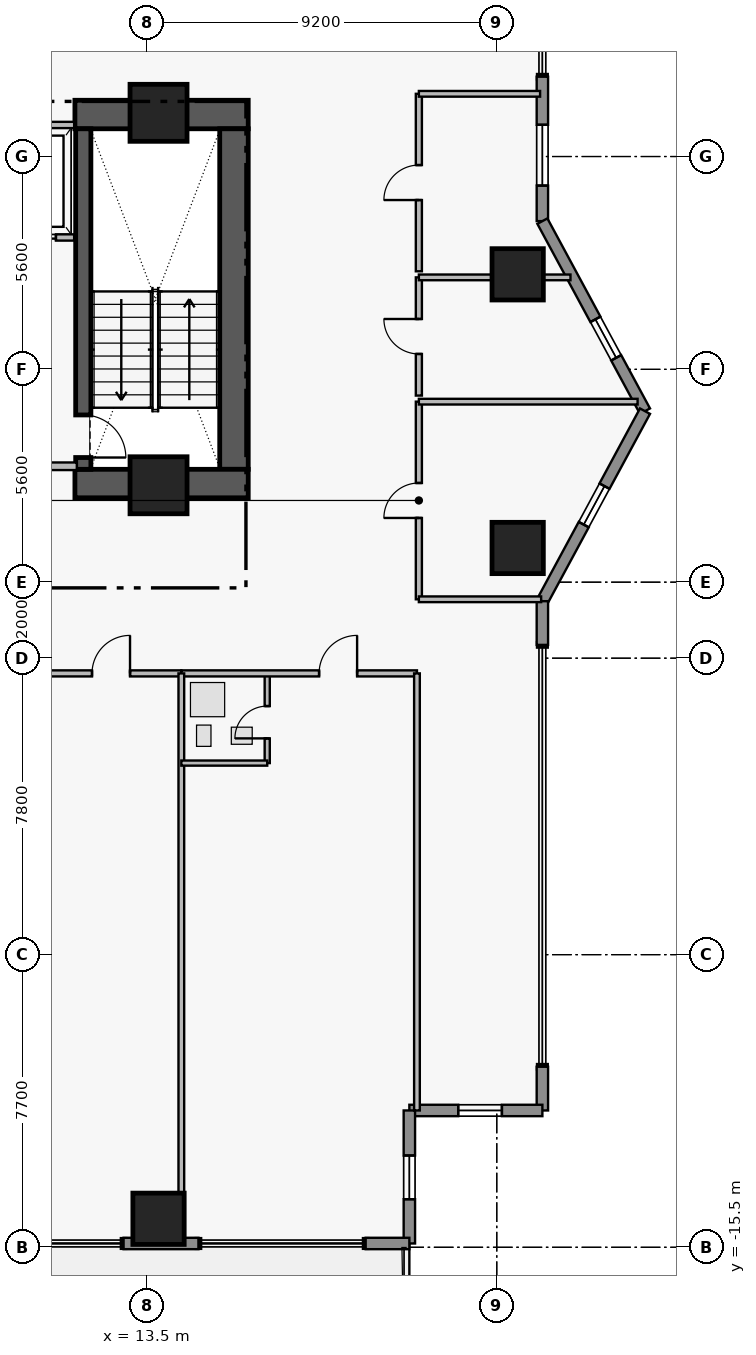
"""IFC4 building model, lengths in metres.
Left out: names, types, materials, properties, quantities, classifications, styles, units other than length and angle.
Written with IfcOpenShell. Run it as: python <this file> out.ifc"""

import sys

from ifc_helpers import new_model, si_unit, direction, frame, frame_2d, origin, origin_2d, place, context, subcontext, project, spatial, rectangle, extrude, element, fill, save


model = new_model("IFC4")
c1 = context("Model", 3, precision=1e-05, world=origin(), true_north=direction((0.0, 1.0)))
c2 = subcontext(c1, "Body", "Model", "MODEL_VIEW")
j1 = project(units=[si_unit("LENGTHUNIT", "METRE"), si_unit("PLANEANGLEUNIT", "RADIAN")], contexts=[c1])
p1 = place(None, origin())
s1 = spatial("IfcSite", under=j1, at=p1, CompositionType="ELEMENT")
p2 = place(p1, origin())
s2 = spatial("IfcBuilding", under=s1, at=p2, CompositionType="ELEMENT")
p3 = place(p2, frame((0.0, 0.0, 150.4)))
s3 = spatial("IfcBuildingStorey", under=s2, at=p3, CompositionType="ELEMENT", Elevation=150.4)
p4 = place(p3, frame((11.6, 14.305, 0.0), z_axis=(0.0, 0.0, 1.0), x_axis=(1.0, 0.0, 0.0)))
e1 = element("IfcWall", 1, at=p4, inside=s3, PredefinedType="SHEAR", context=c2, shape_type="SweptSolid", body=[
    extrude(rectangle(XDim=4.56, YDim=0.75, at=frame_2d((2.28, 0.0))), origin(), (0.0, 0.0, 1.0), 3.46),
])
p5 = place(p3, frame((15.785, 4.97, 0.0), z_axis=(0.0, 0.0, 1.0), x_axis=(0.0, 1.0, 0.0)))
e2 = element("IfcWall", 2, at=p5, inside=s3, PredefinedType="SHEAR", context=c2, shape_type="SweptSolid", body=[
    extrude(rectangle(XDim=8.96, YDim=0.75, at=frame_2d((4.48, 0.0))), origin(), (0.0, 0.0, 1.0), 3.46),
])
p6 = place(p3, frame((11.6, 4.595, 0.0), z_axis=(0.0, 0.0, 1.0), x_axis=(1.0, 0.0, 0.0)))
e3 = element("IfcWall", 3, at=p6, inside=s3, PredefinedType="SHEAR", context=c2, shape_type="SweptSolid", body=[
    extrude(rectangle(XDim=4.56, YDim=0.75, at=frame_2d((2.28, 0.0))), origin(), (0.0, 0.0, 1.0), 3.46),
])
p7 = place(p3, frame((11.82, 13.93, 0.0), z_axis=(0.0, 0.0, 1.0), x_axis=(0.0, -1.0, 0.0)))
e4 = element("IfcWall", 4, at=p7, inside=s3, PredefinedType="SHEAR", context=c2, shape_type="SweptSolid", body=[
    extrude(rectangle(XDim=8.96, YDim=0.4, at=frame_2d((4.48, 0.0))), origin(), (0.0, 0.0, 1.0), 3.46),
])
p8 = place(p7, frame((7.53, 0.0, 0.0)))
e5 = element("IfcOpeningElement", 5, at=p8, cuts=e4, PredefinedType="OPENING", context=c2, shape_type="SweptSolid", body=[
    extrude(rectangle(XDim=1.12, YDim=2.22, at=frame_2d((0.56, 1.11))), frame((0.0, 0.21, 0.0), z_axis=(0.0, -1.0, 0.0), x_axis=(1.0, 0.0, 0.0)), (0.0, 0.0, 1.0), 0.42),
])
for number, where, z_axis, x_axis in (
    (6, (13.8, 14.35, 0.0), (0.0, 0.0, 1.0), (1.0, 0.0, 0.0)),
    (7, (13.8, 4.55, 0.0), (0.0, 0.0, 1.0), (1.0, 0.0, 0.0)),
):
    element("IfcColumn", number, at=place(p3, frame(where, z_axis=z_axis, x_axis=x_axis)), inside=s3, PredefinedType="COLUMN", context=c2, shape_type="SweptSolid", body=[
        extrude(rectangle(XDim=1.5, YDim=1.5, at=origin_2d()), origin(), (0.0, 0.0, 1.0), 3.65),
    ])
for number, where, z_axis, x_axis in (
    (8, (13.8, -14.75, 0.0), (0.0, 0.0, 1.0), (1.0, 0.0, 0.0)),
    (9, (23.25, 2.9, 0.0), (0.0, 0.0, 1.0), (1.0, 0.0, 0.0)),
    (10, (23.25, 10.1, 0.0), (0.0, 0.0, 1.0), (1.0, 0.0, 0.0)),
):
    element("IfcColumn", number, at=place(p3, frame(where, z_axis=z_axis, x_axis=x_axis)), inside=s3, PredefinedType="COLUMN", context=c2, shape_type="SweptSolid", body=[
        extrude(rectangle(XDim=1.35, YDim=1.35, at=origin_2d()), origin(), (0.0, 0.0, 1.0), 3.65),
    ])
p9 = place(p3, frame((23.9, 15.3, 0.0), z_axis=(0.0, 0.0, 1.0), x_axis=(0.0, -1.0, 0.0)))
e11 = element("IfcWall", 11, at=p9, inside=s3, PredefinedType="STANDARD", context=c2, shape_type="SweptSolid", body=[
    extrude(rectangle(XDim=3.8, YDim=0.3, at=frame_2d((1.9, 0.0))), origin(), (0.0, 0.0, 1.0), 3.43),
])
p10 = place(p9, frame((1.265, 0.0, 0.85)))
e12 = element("IfcOpeningElement", 12, at=p10, cuts=e11, PredefinedType="OPENING", context=c2, shape_type="SweptSolid", body=[
    extrude(rectangle(XDim=1.6, YDim=1.8, at=frame_2d((0.8, 0.9))), frame((0.0, 0.16, 0.0), z_axis=(0.0, -1.0, 0.0), x_axis=(1.0, 0.0, 0.0)), (0.0, 0.0, 1.0), 0.32),
])
p11 = place(p3, frame((23.9, 11.5, 0.0), z_axis=(0.0, 0.0, 1.0), x_axis=(0.475175525499, -0.879891027325, 0.0)))
e13 = element("IfcWall", 13, at=p11, inside=s3, PredefinedType="STANDARD", context=c2, shape_type="SweptSolid", body=[
    extrude(rectangle(XDim=5.683, YDim=0.3, at=frame_2d((2.841, 0.0))), origin(), (0.0, 0.0, 1.0), 3.43),
])
p12 = place(p11, frame((2.937, 0.0, 1.25)))
e14 = element("IfcOpeningElement", 14, at=p12, cuts=e13, PredefinedType="OPENING", context=c2, shape_type="SweptSolid", body=[
    extrude(rectangle(XDim=1.15, YDim=1.55, at=frame_2d((0.575, 0.775))), frame((0.0, 0.16, 0.0), z_axis=(0.0, -1.0, 0.0), x_axis=(1.0, 0.0, 0.0)), (0.0, 0.0, 1.0), 0.32),
])
p13 = place(p3, frame((26.6, 6.5, 0.0), z_axis=(0.0, 0.0, 1.0), x_axis=(-0.475175525499, -0.879891027325, 0.0)))
e15 = element("IfcWall", 15, at=p13, inside=s3, PredefinedType="STANDARD", context=c2, shape_type="SweptSolid", body=[
    extrude(rectangle(XDim=5.683, YDim=0.3, at=frame_2d((2.841, 0.0))), origin(), (0.0, 0.0, 1.0), 3.43),
])
p14 = place(p13, frame((2.242, 0.0, 1.25)))
e16 = element("IfcOpeningElement", 16, at=p14, cuts=e15, PredefinedType="OPENING", context=c2, shape_type="SweptSolid", body=[
    extrude(rectangle(XDim=1.15, YDim=1.55, at=frame_2d((0.575, 0.775))), frame((0.0, 0.16, 0.0), z_axis=(0.0, -1.0, 0.0), x_axis=(1.0, 0.0, 0.0)), (0.0, 0.0, 1.0), 0.32),
])
for number, where, z_axis, x_axis in (
    (17, (23.9, 1.5, 0.0), (0.0, 0.0, 1.0), (0.0, -1.0, 0.0)),
    (18, (23.9, -10.75, 0.0), (0.0, 0.0, 1.0), (0.0, -1.0, 0.0)),
):
    element("IfcWall", number, at=place(p3, frame(where, z_axis=z_axis, x_axis=x_axis)), inside=s3, PredefinedType="STANDARD", context=c2, shape_type="SweptSolid", body=[
        extrude(rectangle(XDim=1.15, YDim=0.3, at=frame_2d((0.575, 0.0))), origin(), (0.0, 0.0, 1.0), 3.43),
    ])
p15 = place(p3, frame((23.9, -11.9, 0.0), z_axis=(0.0, 0.0, 1.0), x_axis=(-1.0, 0.0, 0.0)))
e19 = element("IfcWall", 19, at=p15, inside=s3, PredefinedType="STANDARD", context=c2, shape_type="SweptSolid", body=[
    extrude(rectangle(XDim=3.5, YDim=0.3, at=frame_2d((1.75, 0.0))), origin(), (0.0, 0.0, 1.0), 3.43),
])
p16 = place(p15, frame((1.065, 0.0, 1.25)))
e20 = element("IfcOpeningElement", 20, at=p16, cuts=e19, PredefinedType="OPENING", context=c2, shape_type="SweptSolid", body=[
    extrude(rectangle(XDim=1.15, YDim=1.55, at=frame_2d((0.575, 0.775))), frame((0.0, 0.16, 0.0), z_axis=(0.0, -1.0, 0.0), x_axis=(1.0, 0.0, 0.0)), (0.0, 0.0, 1.0), 0.32),
])
p17 = place(p3, frame((20.4, -11.9, 0.0), z_axis=(0.0, 0.0, 1.0), x_axis=(0.0, -1.0, 0.0)))
e21 = element("IfcWall", 21, at=p17, inside=s3, PredefinedType="STANDARD", context=c2, shape_type="SweptSolid", body=[
    extrude(rectangle(XDim=3.5, YDim=0.3, at=frame_2d((1.75, 0.0))), origin(), (0.0, 0.0, 1.0), 3.43),
])
p18 = place(p17, frame((1.185, 0.0, 1.25)))
e22 = element("IfcOpeningElement", 22, at=p18, cuts=e21, PredefinedType="OPENING", context=c2, shape_type="SweptSolid", body=[
    extrude(rectangle(XDim=1.15, YDim=1.55, at=frame_2d((0.575, 0.775))), frame((0.0, 0.16, 0.0), z_axis=(0.0, -1.0, 0.0), x_axis=(1.0, 0.0, 0.0)), (0.0, 0.0, 1.0), 0.32),
])
p19 = place(p3, frame((20.4, -15.4, 0.0), z_axis=(0.0, 0.0, 1.0), x_axis=(-1.0, 0.0, 0.0)))
e23 = element("IfcWall", 23, at=p19, inside=s3, PredefinedType="STANDARD", context=c2, shape_type="SweptSolid", body=[
    extrude(rectangle(XDim=1.15, YDim=0.3, at=frame_2d((0.575, 0.0))), origin(), (0.0, 0.0, 1.0), 3.43),
])
p20 = place(p3, frame((14.85, -15.4, 0.0), z_axis=(0.0, 0.0, 1.0), x_axis=(-1.0, 0.0, 0.0)))
e24 = element("IfcWall", 24, at=p20, inside=s3, PredefinedType="STANDARD", context=c2, shape_type="SweptSolid", body=[
    extrude(rectangle(XDim=1.97, YDim=0.3, at=frame_2d((0.985, 0.0))), origin(), (0.0, 0.0, 1.0), 3.43),
])
p21 = place(p3, frame((9.42, 11.07, 0.0), z_axis=(0.0, 0.0, 1.0), x_axis=(1.0, 0.0, 0.0)))
e25 = element("IfcWall", 25, at=p21, inside=s3, PredefinedType="PARTITIONING", context=c2, shape_type="SweptSolid", body=[
    extrude(rectangle(XDim=2.16, YDim=0.165, at=frame_2d((1.08, 0.0))), origin(), (0.0, 0.0, 1.0), 3.43),
])
p22 = place(p21, frame((0.53, 0.0, 0.0)))
e26 = element("IfcOpeningElement", 26, at=p22, cuts=e25, PredefinedType="OPENING", context=c2, shape_type="SweptSolid", body=[
    extrude(rectangle(XDim=1.15, YDim=2.25, at=frame_2d((0.575, 1.125))), frame((0.0, 0.093, 0.0), z_axis=(0.0, -1.0, 0.0), x_axis=(1.0, 0.0, 0.0)), (0.0, 0.0, 1.0), 0.185),
])
p23 = place(p3, frame((8.4, -0.4, 0.0), z_axis=(0.0, 0.0, 1.0), x_axis=(1.0, 0.0, 0.0)))
e27 = element("IfcWall", 27, at=p23, inside=s3, PredefinedType="PARTITIONING", context=c2, shape_type="SweptSolid", body=[
    extrude(rectangle(XDim=6.0, YDim=0.16, at=frame_2d((3.0, 0.0))), origin(), (0.0, 0.0, 1.0), 3.43),
])
p24 = place(p23, frame((3.65, 0.0, 0.0)))
e28 = element("IfcOpeningElement", 28, at=p24, cuts=e27, PredefinedType="OPENING", context=c2, shape_type="SweptSolid", body=[
    extrude(rectangle(XDim=1.0, YDim=2.15, at=frame_2d((0.5, 1.075))), frame((0.0, 0.09, 0.0), z_axis=(0.0, -1.0, 0.0), x_axis=(1.0, 0.0, 0.0)), (0.0, 0.0, 1.0), 0.18),
])
p25 = place(p3, frame((16.66, -2.76, 0.0), z_axis=(0.0, 0.0, 1.0), x_axis=(0.0, 1.0, 0.0)))
e29 = element("IfcWall", 29, at=p25, inside=s3, PredefinedType="PLUMBINGWALL", context=c2, shape_type="SweptSolid", body=[
    extrude(rectangle(XDim=2.36, YDim=0.135, at=frame_2d((1.18, 0.0))), origin(), (0.0, 0.0, 1.0), 3.43),
])
p26 = place(p25, frame((0.65, 0.0, 0.0)))
e30 = element("IfcOpeningElement", 30, at=p26, cuts=e29, PredefinedType="OPENING", context=c2, shape_type="SweptSolid", body=[
    extrude(rectangle(XDim=0.85, YDim=2.1, at=frame_2d((0.425, 1.05))), frame((0.0, 0.077, 0.0), z_axis=(0.0, -1.0, 0.0), x_axis=(1.0, 0.0, 0.0)), (0.0, 0.0, 1.0), 0.155),
])
p27 = place(p3, frame((14.4, -0.4, 0.0), z_axis=(0.0, 0.0, 1.0), x_axis=(1.0, 0.0, 0.0)))
e31 = element("IfcWall", 31, at=p27, inside=s3, PredefinedType="PARTITIONING", context=c2, shape_type="SweptSolid", body=[
    extrude(rectangle(XDim=6.2, YDim=0.16, at=frame_2d((3.1, 0.0))), origin(), (0.0, 0.0, 1.0), 3.43),
])
p28 = place(p27, frame((3.625, 0.0, 0.0)))
e32 = element("IfcOpeningElement", 32, at=p28, cuts=e31, PredefinedType="OPENING", context=c2, shape_type="SweptSolid", body=[
    extrude(rectangle(XDim=1.0, YDim=2.15, at=frame_2d((0.5, 1.075))), frame((0.0, 0.09, 0.0), z_axis=(0.0, -1.0, 0.0), x_axis=(1.0, 0.0, 0.0)), (0.0, 0.0, 1.0), 0.18),
])
p29 = place(p3, frame((20.65, 1.55, 0.0), z_axis=(0.0, 0.0, 1.0), x_axis=(0.0, 1.0, 0.0)))
e33 = element("IfcWall", 33, at=p29, inside=s3, PredefinedType="PARTITIONING", context=c2, shape_type="SweptSolid", body=[
    extrude(rectangle(XDim=5.2, YDim=0.16, at=frame_2d((2.6, 0.0))), origin(), (0.0, 0.0, 1.0), 3.43),
])
p30 = place(p29, frame((2.14, 0.0, 0.0)))
e34 = element("IfcOpeningElement", 34, at=p30, cuts=e33, PredefinedType="OPENING", context=c2, shape_type="SweptSolid", body=[
    extrude(rectangle(XDim=0.92, YDim=2.12, at=frame_2d((0.46, 1.06))), frame((0.0, 0.09, 0.0), z_axis=(0.0, -1.0, 0.0), x_axis=(1.0, 0.0, 0.0)), (0.0, 0.0, 1.0), 0.18),
])
p31 = place(p3, frame((20.65, 6.91, 0.0), z_axis=(0.0, 0.0, 1.0), x_axis=(0.0, 1.0, 0.0)))
e35 = element("IfcWall", 35, at=p31, inside=s3, PredefinedType="PARTITIONING", context=c2, shape_type="SweptSolid", body=[
    extrude(rectangle(XDim=3.11, YDim=0.16, at=frame_2d((1.555, 0.0))), origin(), (0.0, 0.0, 1.0), 3.43),
])
p32 = place(p31, frame((1.095, 0.0, 0.0)))
e36 = element("IfcOpeningElement", 36, at=p32, cuts=e35, PredefinedType="OPENING", context=c2, shape_type="SweptSolid", body=[
    extrude(rectangle(XDim=0.92, YDim=2.12, at=frame_2d((0.46, 1.06))), frame((0.0, 0.09, 0.0), z_axis=(0.0, -1.0, 0.0), x_axis=(1.0, 0.0, 0.0)), (0.0, 0.0, 1.0), 0.18),
])
p33 = place(p3, frame((20.65, 10.18, 0.0), z_axis=(0.0, 0.0, 1.0), x_axis=(0.0, 1.0, 0.0)))
e37 = element("IfcWall", 37, at=p33, inside=s3, PredefinedType="PARTITIONING", context=c2, shape_type="SweptSolid", body=[
    extrude(rectangle(XDim=4.67, YDim=0.16, at=frame_2d((2.335, 0.0))), origin(), (0.0, 0.0, 1.0), 3.43),
])
p34 = place(p33, frame((1.875, 0.0, 0.0)))
e38 = element("IfcOpeningElement", 38, at=p34, cuts=e37, PredefinedType="OPENING", context=c2, shape_type="SweptSolid", body=[
    extrude(rectangle(XDim=0.92, YDim=2.12, at=frame_2d((0.46, 1.06))), frame((0.0, 0.09, 0.0), z_axis=(0.0, -1.0, 0.0), x_axis=(1.0, 0.0, 0.0)), (0.0, 0.0, 1.0), 0.18),
])
p35 = place(p3, frame((8.8, 5.05, 0.0), z_axis=(0.0, 0.0, 1.0), x_axis=(1.0, 0.0, 0.0)))
e39 = element("IfcWall", 39, at=p35, inside=s3, PredefinedType="PARTITIONING", context=c2, shape_type="SweptSolid", body=[
    extrude(rectangle(XDim=2.85, YDim=0.2, at=frame_2d((1.425, 0.0))), origin(), (0.0, 0.0, 1.0), 3.43),
])
p36 = place(p3, frame((9.42, 14.03, 0.0), z_axis=(0.0, 0.0, 1.0), x_axis=(1.0, 0.0, 0.0)))
e40 = element("IfcWall", 40, at=p36, inside=s3, PredefinedType="PARTITIONING", context=c2, shape_type="SweptSolid", body=[
    extrude(rectangle(XDim=2.16, YDim=0.165, at=frame_2d((1.08, 0.0))), origin(), (0.0, 0.0, 1.0), 3.43),
])
p37 = place(p3, frame((14.4, -15.32, 0.0), z_axis=(0.0, 0.0, 1.0), x_axis=(0.0, 1.0, 0.0)))
e41 = element("IfcWall", 41, at=p37, inside=s3, PredefinedType="PARTITIONING", context=c2, shape_type="SweptSolid", body=[
    extrude(rectangle(XDim=14.92, YDim=0.15, at=frame_2d((7.46, 0.0))), origin(), (0.0, 0.0, 1.0), 3.43),
])
p38 = place(p3, frame((14.4, -2.76, 0.0), z_axis=(0.0, 0.0, 1.0), x_axis=(1.0, 0.0, 0.0)))
e42 = element("IfcWall", 42, at=p38, inside=s3, PredefinedType="PLUMBINGWALL", context=c2, shape_type="SweptSolid", body=[
    extrude(rectangle(XDim=2.26, YDim=0.135, at=frame_2d((1.13, 0.0))), origin(), (0.0, 0.0, 1.0), 3.43),
])
p39 = place(p3, frame((20.6, -11.9, 0.0), z_axis=(0.0, 0.0, 1.0), x_axis=(0.0, 1.0, 0.0)))
e43 = element("IfcWall", 43, at=p39, inside=s3, PredefinedType="PARTITIONING", context=c2, shape_type="SweptSolid", body=[
    extrude(rectangle(XDim=11.5, YDim=0.15, at=frame_2d((5.75, 0.0))), origin(), (0.0, 0.0, 1.0), 3.43),
])
p40 = place(p3, frame((20.65, 1.55, 0.0), z_axis=(0.0, 0.0, 1.0), x_axis=(1.0, 0.0, 0.0)))
e44 = element("IfcWall", 44, at=p40, inside=s3, PredefinedType="PARTITIONING", context=c2, shape_type="SweptSolid", body=[
    extrude(rectangle(XDim=3.217, YDim=0.15, at=frame_2d((1.608, 0.0))), origin(), (0.0, 0.0, 1.0), 3.43),
])
p41 = place(p3, frame((20.65, 6.75, 0.0), z_axis=(0.0, 0.0, 1.0), x_axis=(1.0, 0.0, 0.0)))
e45 = element("IfcWall", 45, at=p41, inside=s3, PredefinedType="PARTITIONING", context=c2, shape_type="SweptSolid", body=[
    extrude(rectangle(XDim=5.755, YDim=0.15, at=frame_2d((2.877, 0.0))), origin(), (0.0, 0.0, 1.0), 3.43),
])
p42 = place(p3, frame((20.65, 10.02, 0.0), z_axis=(0.0, 0.0, 1.0), x_axis=(1.0, 0.0, 0.0)))
e46 = element("IfcWall", 46, at=p42, inside=s3, PredefinedType="PARTITIONING", context=c2, shape_type="SweptSolid", body=[
    extrude(rectangle(XDim=3.989, YDim=0.15, at=frame_2d((1.995, 0.0))), origin(), (0.0, 0.0, 1.0), 3.43),
])
p43 = place(p3, frame((20.65, 14.85, 0.0), z_axis=(0.0, 0.0, 1.0), x_axis=(1.0, 0.0, 0.0)))
e47 = element("IfcWall", 47, at=p43, inside=s3, PredefinedType="PARTITIONING", context=c2, shape_type="SweptSolid", body=[
    extrude(rectangle(XDim=3.19, YDim=0.15, at=frame_2d((1.595, 0.0))), origin(), (0.0, 0.0, 1.0), 3.43),
])
p44 = place(p10, origin())
e48 = element("IfcWindow", 48, at=p44, inside=s3, PartitioningType="SINGLE_PANEL", PredefinedType="WINDOW", context=c2, shape_type="SweptSolid", body=[
    extrude(rectangle(XDim=1.6, YDim=1.8, at=frame_2d((0.8, 0.9))), frame((0.0, 0.03, 0.0), z_axis=(0.0, -1.0, 0.0), x_axis=(1.0, 0.0, 0.0)), (0.0, 0.0, 1.0), 0.06),
])
fill(e12, e48)
p45 = place(p12, origin())
e49 = element("IfcWindow", 49, at=p45, inside=s3, PartitioningType="SINGLE_PANEL", PredefinedType="WINDOW", context=c2, shape_type="SweptSolid", body=[
    extrude(rectangle(XDim=1.15, YDim=1.55, at=frame_2d((0.575, 0.775))), frame((0.0, 0.03, 0.0), z_axis=(0.0, -1.0, 0.0), x_axis=(1.0, 0.0, 0.0)), (0.0, 0.0, 1.0), 0.06),
])
fill(e14, e49)
p46 = place(p14, origin())
e50 = element("IfcWindow", 50, at=p46, inside=s3, PartitioningType="SINGLE_PANEL", PredefinedType="WINDOW", context=c2, shape_type="SweptSolid", body=[
    extrude(rectangle(XDim=1.15, YDim=1.55, at=frame_2d((0.575, 0.775))), frame((0.0, 0.03, 0.0), z_axis=(0.0, -1.0, 0.0), x_axis=(1.0, 0.0, 0.0)), (0.0, 0.0, 1.0), 0.06),
])
fill(e16, e50)
p47 = place(p16, origin())
e51 = element("IfcWindow", 51, at=p47, inside=s3, PartitioningType="SINGLE_PANEL", PredefinedType="WINDOW", context=c2, shape_type="SweptSolid", body=[
    extrude(rectangle(XDim=1.15, YDim=1.55, at=frame_2d((0.575, 0.775))), frame((0.0, 0.03, 0.0), z_axis=(0.0, -1.0, 0.0), x_axis=(1.0, 0.0, 0.0)), (0.0, 0.0, 1.0), 0.06),
])
fill(e20, e51)
p48 = place(p18, origin())
e52 = element("IfcWindow", 52, at=p48, inside=s3, PartitioningType="SINGLE_PANEL", PredefinedType="WINDOW", context=c2, shape_type="SweptSolid", body=[
    extrude(rectangle(XDim=1.15, YDim=1.55, at=frame_2d((0.575, 0.775))), frame((0.0, 0.03, 0.0), z_axis=(0.0, -1.0, 0.0), x_axis=(1.0, 0.0, 0.0)), (0.0, 0.0, 1.0), 0.06),
])
fill(e22, e52)
p49 = place(p8, origin())
e53 = element("IfcDoor", 53, at=p49, inside=s3, OperationType="SINGLE_SWING_RIGHT", PredefinedType="DOOR", context=c2, shape_type="SweptSolid", body=[
    extrude(rectangle(XDim=1.12, YDim=2.22, at=frame_2d((0.56, 1.11))), frame((0.0, 0.025, 0.0), z_axis=(0.0, -1.0, 0.0), x_axis=(1.0, 0.0, 0.0)), (0.0, 0.0, 1.0), 0.05),
])
fill(e5, e53)
p50 = place(p22, origin())
e54 = element("IfcDoor", 54, at=p50, inside=s3, OperationType="SLIDING_TO_LEFT", PredefinedType="DOOR", context=c2, shape_type="SweptSolid", body=[
    extrude(rectangle(XDim=1.15, YDim=2.25, at=frame_2d((0.575, 1.125))), frame((0.0, 0.025, 0.0), z_axis=(0.0, -1.0, 0.0), x_axis=(1.0, 0.0, 0.0)), (0.0, 0.0, 1.0), 0.05),
])
fill(e26, e54)
p51 = place(p24, origin())
e55 = element("IfcDoor", 55, at=p51, inside=s3, OperationType="SINGLE_SWING_RIGHT", PredefinedType="DOOR", context=c2, shape_type="SweptSolid", body=[
    extrude(rectangle(XDim=1.0, YDim=2.15, at=frame_2d((0.5, 1.075))), frame((0.0, 0.025, 0.0), z_axis=(0.0, -1.0, 0.0), x_axis=(1.0, 0.0, 0.0)), (0.0, 0.0, 1.0), 0.05),
])
fill(e28, e55)
p52 = place(p26, origin())
e56 = element("IfcDoor", 56, at=p52, inside=s3, OperationType="SINGLE_SWING_LEFT", PredefinedType="DOOR", context=c2, shape_type="SweptSolid", body=[
    extrude(rectangle(XDim=0.85, YDim=2.1, at=frame_2d((0.425, 1.05))), frame((0.0, 0.025, 0.0), z_axis=(0.0, -1.0, 0.0), x_axis=(1.0, 0.0, 0.0)), (0.0, 0.0, 1.0), 0.05),
])
fill(e30, e56)
p53 = place(p28, origin())
e57 = element("IfcDoor", 57, at=p53, inside=s3, OperationType="SINGLE_SWING_RIGHT", PredefinedType="DOOR", context=c2, shape_type="SweptSolid", body=[
    extrude(rectangle(XDim=1.0, YDim=2.15, at=frame_2d((0.5, 1.075))), frame((0.0, 0.025, 0.0), z_axis=(0.0, -1.0, 0.0), x_axis=(1.0, 0.0, 0.0)), (0.0, 0.0, 1.0), 0.05),
])
fill(e32, e57)
p54 = place(p30, origin())
e58 = element("IfcDoor", 58, at=p54, inside=s3, OperationType="SINGLE_SWING_LEFT", PredefinedType="DOOR", context=c2, shape_type="SweptSolid", body=[
    extrude(rectangle(XDim=0.92, YDim=2.12, at=frame_2d((0.46, 1.06))), frame((0.0, 0.025, 0.0), z_axis=(0.0, -1.0, 0.0), x_axis=(1.0, 0.0, 0.0)), (0.0, 0.0, 1.0), 0.05),
])
fill(e34, e58)
p55 = place(p32, origin())
e59 = element("IfcDoor", 59, at=p55, inside=s3, OperationType="SINGLE_SWING_RIGHT", PredefinedType="DOOR", context=c2, shape_type="SweptSolid", body=[
    extrude(rectangle(XDim=0.92, YDim=2.12, at=frame_2d((0.46, 1.06))), frame((0.0, 0.025, 0.0), z_axis=(0.0, -1.0, 0.0), x_axis=(1.0, 0.0, 0.0)), (0.0, 0.0, 1.0), 0.05),
])
fill(e36, e59)
p56 = place(p34, origin())
e60 = element("IfcDoor", 60, at=p56, inside=s3, OperationType="SINGLE_SWING_LEFT", PredefinedType="DOOR", context=c2, shape_type="SweptSolid", body=[
    extrude(rectangle(XDim=0.92, YDim=2.12, at=frame_2d((0.46, 1.06))), frame((0.0, 0.025, 0.0), z_axis=(0.0, -1.0, 0.0), x_axis=(1.0, 0.0, 0.0)), (0.0, 0.0, 1.0), 0.05),
])
fill(e38, e60)
save(model, sys.argv[1])
